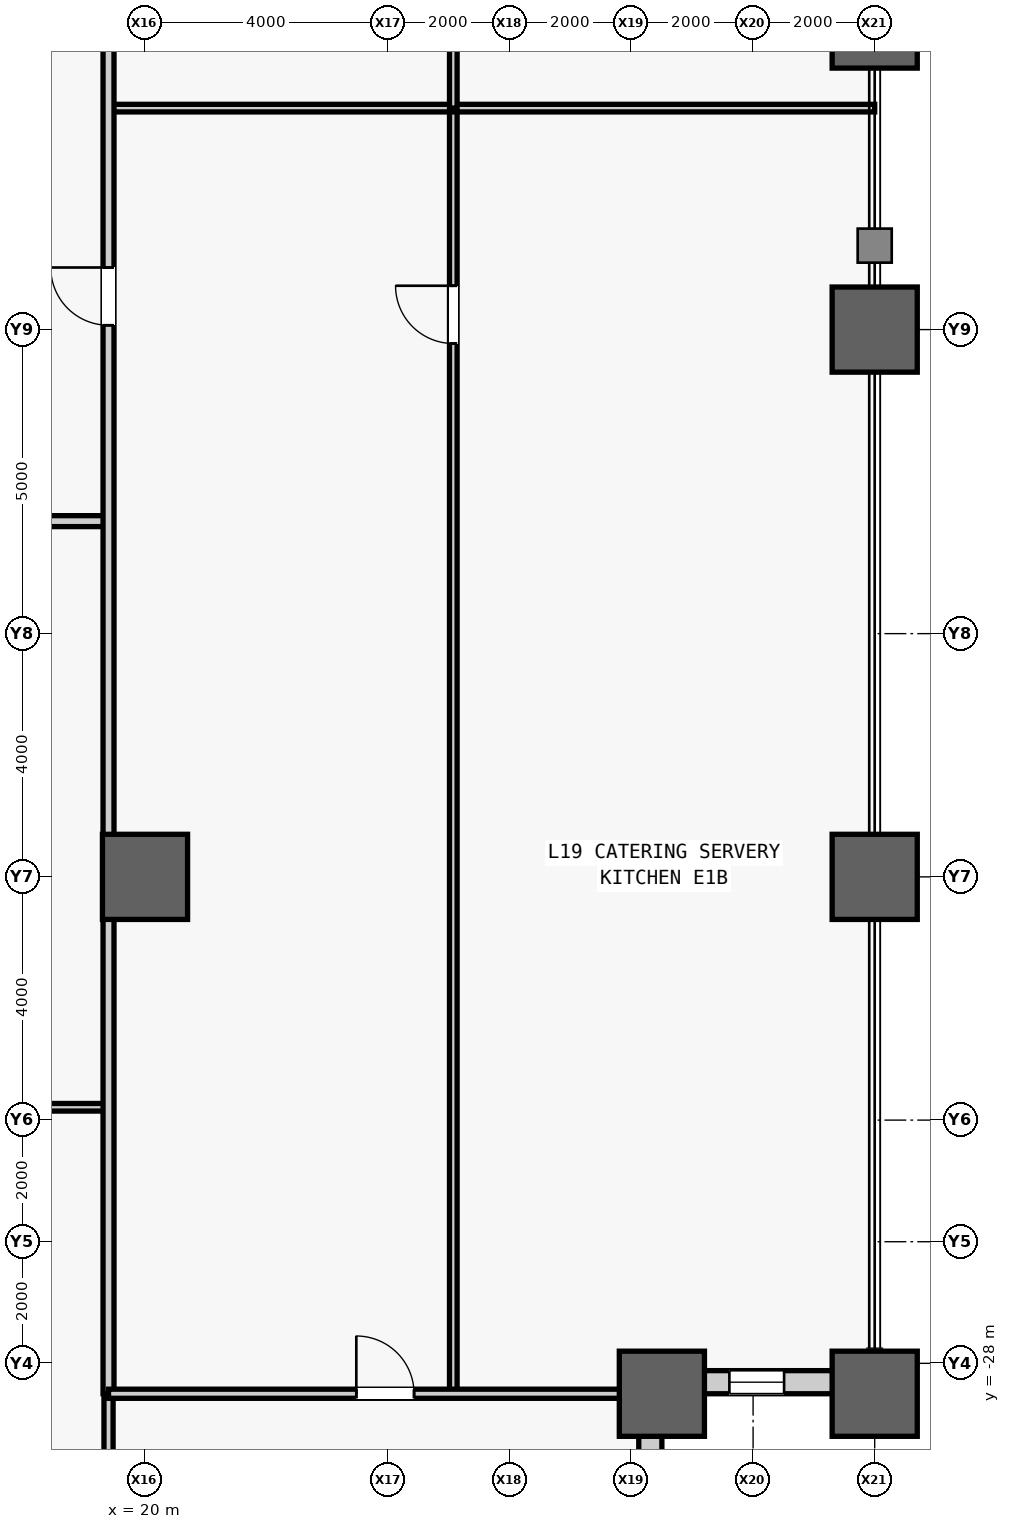
"""IFC4 building model, lengths in metres.
Left out: names, types, materials, properties, quantities, classifications, styles, units other than length and angle.
Written with IfcOpenShell. Run it as: python <this file> out.ifc"""

import sys

from ifc_helpers import new_model, si_unit, direction, frame, frame_2d, origin, origin_2d, place, context, subcontext, project, spatial, rectangle, hollow_rectangle, extrude, source, transform, mapped, element, fill, save


model = new_model("IFC4")
c1 = context("Model", 3, precision=1e-05, world=origin(), true_north=direction((0.0, 1.0)))
c2 = subcontext(c1, "Body", "Model", "MODEL_VIEW")
j1 = project(units=[si_unit("LENGTHUNIT", "METRE"), si_unit("PLANEANGLEUNIT", "RADIAN")], contexts=[c1])
p1 = place(None, origin())
s1 = spatial("IfcSite", under=j1, at=p1, CompositionType="ELEMENT")
p2 = place(p1, origin())
s2 = spatial("IfcBuilding", under=s1, at=p2, CompositionType="ELEMENT")
p3 = place(p2, frame((0.0, 0.0, 87.2)))
s3 = spatial("IfcBuildingStorey", under=s2, at=p3, CompositionType="ELEMENT", Elevation=87.2)
m1 = source(origin(), c2, "Body", "SweptSolid", [
    extrude(hollow_rectangle(XDim=1.4, YDim=1.4, WallThickness=0.075, at=origin_2d()), origin(), (0.0, 0.0, 1.0), 4.2),
])
for number, where, z_axis, x_axis in (
    (1, (20.0, -20.0, 0.0), (0.0, 0.0, 1.0), (1.0, 0.0, 0.0)),
    (2, (28.5, -28.5, 0.0), (0.0, 0.0, 1.0), (1.0, 0.0, 0.0)),
    (3, (32.0, -28.5, 0.0), (0.0, 0.0, 1.0), (1.0, 0.0, 0.0)),
    (4, (32.0, -20.0, 0.0), (0.0, 0.0, 1.0), (1.0, 0.0, 0.0)),
    (5, (32.0, -11.0, 0.0), (0.0, 0.0, 1.0), (1.0, 0.0, 0.0)),
    (6, (32.0, -6.0, 0.0), (0.0, 0.0, 1.0), (1.0, 0.0, 0.0)),
):
    element("IfcColumn", number, at=place(p3, frame(where, z_axis=z_axis, x_axis=x_axis)), inside=s3, PredefinedType="COLUMN", context=c2, shape_type="MappedRepresentation", body=[
        mapped(m1, transform((0.0, 0.0, 0.0), scale=1.0)),
    ])
m2 = source(origin(), c2, "Body", "SweptSolid", [
    extrude(rectangle(XDim=3.12, YDim=0.38, at=frame_2d((1.56, 0.0))), origin(), (0.0, 0.0, 1.0), 2.54),
])
p4 = place(p3, frame((28.31, -31.62, 0.0), z_axis=(0.0, 0.0, 1.0), x_axis=(0.0, 1.0, 0.0)))
e7 = element("IfcWall", 7, at=p4, inside=s3, PredefinedType="STANDARD", context=c2, shape_type="MappedRepresentation", body=[
    mapped(m2, transform((0.0, 0.0, 0.0), scale=1.0)),
])
m3 = source(origin(), c2, "Body", "SweptSolid", [
    extrude(rectangle(XDim=0.9, YDim=1.82, at=frame_2d((0.45, 0.91))), frame((0.0, 0.2, 0.0), z_axis=(0.0, -1.0, 0.0), x_axis=(1.0, 0.0, 0.0)), (0.0, 0.0, 1.0), 0.4),
])
p5 = place(p4, frame((1.11, 0.0, 0.5)))
e8 = element("IfcOpeningElement", 8, at=p5, cuts=e7, PredefinedType="OPENING", context=c2, shape_type="MappedRepresentation", body=[
    mapped(m3, transform((0.0, 0.0, 0.0), scale=1.0)),
])
m4 = source(origin(), c2, "Body", "SweptSolid", [
    extrude(rectangle(XDim=3.12, YDim=0.38, at=frame_2d((1.56, 0.0))), origin(), (0.0, 0.0, 1.0), 3.245),
])
p6 = place(p3, frame((28.5, -28.31, 0.0), z_axis=(0.0, 0.0, 1.0), x_axis=(1.0, 0.0, 0.0)))
e9 = element("IfcWall", 9, at=p6, inside=s3, PredefinedType="STANDARD", context=c2, shape_type="MappedRepresentation", body=[
    mapped(m4, transform((0.0, 0.0, 0.0), scale=1.0)),
])
m5 = source(origin(), c2, "Body", "SweptSolid", [
    extrude(rectangle(XDim=0.9, YDim=2.4, at=frame_2d((0.45, 1.2))), frame((0.0, 0.2, 0.0), z_axis=(0.0, -1.0, 0.0), x_axis=(1.0, 0.0, 0.0)), (0.0, 0.0, 1.0), 0.4),
])
p7 = place(p6, frame((1.11, 0.0, 0.5)))
e10 = element("IfcOpeningElement", 10, at=p7, cuts=e9, PredefinedType="OPENING", context=c2, shape_type="MappedRepresentation", body=[
    mapped(m5, transform((0.0, 0.0, 0.0), scale=1.0)),
])
m6 = source(origin(), c2, "Body", "SweptSolid", [
    extrude(rectangle(XDim=6.072, YDim=0.125, at=frame_2d((3.036, 0.0))), origin(), (0.0, 0.0, 1.0), 3.94),
])
p8 = place(p3, frame((13.328, -23.789, 0.0), z_axis=(0.0, 0.0, 1.0), x_axis=(1.0, 0.0, 0.0)))
e11 = element("IfcWall", 11, at=p8, inside=s3, PredefinedType="PARTITIONING", context=c2, shape_type="MappedRepresentation", body=[
    mapped(m6, transform((0.0, 0.0, 0.0), scale=1.0)),
])
m7 = source(origin(), c2, "Body", "SweptSolid", [
    extrude(rectangle(XDim=0.95, YDim=2.15, at=frame_2d((0.475, 1.075))), frame((0.0, 0.073, 0.0), z_axis=(0.0, -1.0, 0.0), x_axis=(1.0, 0.0, 0.0)), (0.0, 0.0, 1.0), 0.145),
])
p9 = place(p8, frame((2.561, 0.0, 0.0)))
e12 = element("IfcOpeningElement", 12, at=p9, cuts=e11, PredefinedType="OPENING", context=c2, shape_type="MappedRepresentation", body=[
    mapped(m7, transform((0.0, 0.0, 0.0), scale=1.0)),
])
m8 = source(origin(), c2, "Body", "SweptSolid", [
    extrude(rectangle(XDim=37.95, YDim=0.18, at=frame_2d((18.975, 0.0))), origin(), (0.0, 0.0, 1.0), 3.94),
])
p10 = place(p3, frame((-18.55, -14.15, 0.0), z_axis=(0.0, 0.0, 1.0), x_axis=(1.0, 0.0, 0.0)))
e13 = element("IfcWall", 13, at=p10, inside=s3, PredefinedType="PARTITIONING", context=c2, shape_type="MappedRepresentation", body=[
    mapped(m8, transform((0.0, 0.0, 0.0), scale=1.0)),
])
m9 = source(origin(), c2, "Body", "SweptSolid", [
    extrude(rectangle(XDim=1.05, YDim=2.2, at=frame_2d((0.525, 1.1))), frame((0.0, 0.1, 0.0), z_axis=(0.0, -1.0, 0.0), x_axis=(1.0, 0.0, 0.0)), (0.0, 0.0, 1.0), 0.2),
])
p11 = place(p10, frame((4.966, 0.0, 0.0)))
e14 = element("IfcOpeningElement", 14, at=p11, cuts=e13, PredefinedType="OPENING", context=c2, shape_type="MappedRepresentation", body=[
    mapped(m9, transform((0.0, 0.0, 0.0), scale=1.0)),
])
p12 = place(p10, frame((10.291, 0.0, 0.0)))
e15 = element("IfcOpeningElement", 15, at=p12, cuts=e13, PredefinedType="OPENING", context=c2, shape_type="MappedRepresentation", body=[
    mapped(m9, transform((0.0, 0.0, 0.0), scale=1.0)),
])
p13 = place(p10, frame((18.64, 0.0, 0.0)))
e16 = element("IfcOpeningElement", 16, at=p13, cuts=e13, PredefinedType="OPENING", context=c2, shape_type="MappedRepresentation", body=[
    mapped(m9, transform((0.0, 0.0, 0.0), scale=1.0)),
])
p14 = place(p10, frame((27.178, 0.0, 0.0)))
e17 = element("IfcOpeningElement", 17, at=p14, cuts=e13, PredefinedType="OPENING", context=c2, shape_type="MappedRepresentation", body=[
    mapped(m9, transform((0.0, 0.0, 0.0), scale=1.0)),
])
m10 = source(origin(), c2, "Body", "SweptSolid", [
    extrude(rectangle(XDim=3.5, YDim=0.15, at=frame_2d((1.75, 0.0))), origin(), (0.0, 0.0, 1.0), 3.94),
])
p15 = place(p3, frame((19.4, -32.0, 0.0), z_axis=(0.0, 0.0, 1.0), x_axis=(0.0, 1.0, 0.0)))
e18 = element("IfcWall", 18, at=p15, inside=s3, PredefinedType="PARTITIONING", context=c2, shape_type="MappedRepresentation", body=[
    mapped(m10, transform((0.0, 0.0, 0.0), scale=1.0)),
])
m11 = source(origin(), c2, "Body", "SweptSolid", [
    extrude(rectangle(XDim=21.142, YDim=0.125, at=frame_2d((10.571, 0.0))), origin(), (0.0, 0.0, 1.0), 3.94),
])
p16 = place(p3, frame((25.07, -28.5, 0.0), z_axis=(0.0, 0.0, 1.0), x_axis=(0.0, 1.0, 0.0)))
e19 = element("IfcWall", 19, at=p16, inside=s3, PredefinedType="PARTITIONING", context=c2, shape_type="MappedRepresentation", body=[
    mapped(m11, transform((0.0, 0.0, 0.0), scale=1.0)),
])
p17 = place(p16, frame((17.271, 0.0, 0.0)))
e20 = element("IfcOpeningElement", 20, at=p17, cuts=e19, PredefinedType="OPENING", context=c2, shape_type="MappedRepresentation", body=[
    mapped(m7, transform((0.0, 0.0, 0.0), scale=1.0)),
])
m12 = source(origin(), c2, "Body", "SweptSolid", [
    extrude(rectangle(XDim=12.6, YDim=0.125, at=frame_2d((6.3, 0.0))), origin(), (0.0, 0.0, 1.0), 3.94),
])
p18 = place(p3, frame((19.4, -7.358, 0.0), z_axis=(0.0, 0.0, 1.0), x_axis=(1.0, 0.0, 0.0)))
e21 = element("IfcWall", 21, at=p18, inside=s3, PredefinedType="PARTITIONING", context=c2, shape_type="MappedRepresentation", body=[
    mapped(m12, transform((0.0, 0.0, 0.0), scale=1.0)),
])
m13 = source(origin(), c2, "Body", "SweptSolid", [
    extrude(rectangle(XDim=8.773, YDim=0.125, at=frame_2d((4.386, 0.0))), origin(), (0.0, 0.0, 1.0), 3.94),
])
p19 = place(p3, frame((25.07, -7.358, 0.0), z_axis=(0.0, 0.0, 1.0), x_axis=(0.0, 1.0, 0.0)))
e22 = element("IfcWall", 22, at=p19, inside=s3, PredefinedType="PARTITIONING", context=c2, shape_type="MappedRepresentation", body=[
    mapped(m13, transform((0.0, 0.0, 0.0), scale=1.0)),
])
p20 = place(p19, frame((3.912, 0.0, 0.0)))
e23 = element("IfcOpeningElement", 23, at=p20, cuts=e22, PredefinedType="OPENING", context=c2, shape_type="MappedRepresentation", body=[
    mapped(m7, transform((0.0, 0.0, 0.0), scale=1.0)),
])
m14 = source(origin(), c2, "Body", "SweptSolid", [
    extrude(rectangle(XDim=57.0, YDim=0.18, at=frame_2d((28.5, 0.0))), origin(), (0.0, 0.0, 1.0), 3.471),
])
p21 = place(p3, frame((19.4, -28.5, 0.0), z_axis=(0.0, 0.0, 1.0), x_axis=(0.0, 1.0, 0.0)))
e24 = element("IfcWall", 24, at=p21, inside=s3, PredefinedType="PARTITIONING", context=c2, shape_type="MappedRepresentation", body=[
    mapped(m14, transform((0.0, 0.0, 0.0), scale=1.0)),
])
m15 = source(origin(), c2, "Body", "SweptSolid", [
    extrude(rectangle(XDim=0.95, YDim=2.15, at=frame_2d((0.475, 1.075))), frame((0.0, 0.1, 0.0), z_axis=(0.0, -1.0, 0.0), x_axis=(1.0, 0.0, 0.0)), (0.0, 0.0, 1.0), 0.2),
])
p22 = place(p21, frame((17.571, 0.0, 0.0)))
e25 = element("IfcOpeningElement", 25, at=p22, cuts=e24, PredefinedType="OPENING", context=c2, shape_type="MappedRepresentation", body=[
    mapped(m15, transform((0.0, 0.0, 0.0), scale=1.0)),
])
p23 = place(p21, frame((25.053, 0.0, 0.0)))
e26 = element("IfcOpeningElement", 26, at=p23, cuts=e24, PredefinedType="OPENING", context=c2, shape_type="MappedRepresentation", body=[
    mapped(m15, transform((0.0, 0.0, 0.0), scale=1.0)),
])
p24 = place(p21, frame((33.26, 0.0, 0.0)))
e27 = element("IfcOpeningElement", 27, at=p24, cuts=e24, PredefinedType="OPENING", context=c2, shape_type="MappedRepresentation", body=[
    mapped(m15, transform((0.0, 0.0, 0.0), scale=1.0)),
])
p25 = place(p21, frame((39.328, 0.0, 0.0)))
e28 = element("IfcOpeningElement", 28, at=p25, cuts=e24, PredefinedType="OPENING", context=c2, shape_type="MappedRepresentation", body=[
    mapped(m15, transform((0.0, 0.0, 0.0), scale=1.0)),
])
m16 = source(origin(), c2, "Body", "SweptSolid", [
    extrude(rectangle(XDim=9.1, YDim=0.15, at=frame_2d((4.55, 0.0))), origin(), (0.0, 0.0, 1.0), 3.94),
])
p26 = place(p3, frame((19.4, -28.5, 0.0), z_axis=(0.0, 0.0, 1.0), x_axis=(1.0, 0.0, 0.0)))
e29 = element("IfcWall", 29, at=p26, inside=s3, PredefinedType="PARTITIONING", context=c2, shape_type="MappedRepresentation", body=[
    mapped(m16, transform((0.0, 0.0, 0.0), scale=1.0)),
])
m17 = source(origin(), c2, "Body", "SweptSolid", [
    extrude(rectangle(XDim=0.95, YDim=2.15, at=frame_2d((0.475, 1.075))), frame((0.0, 0.085, 0.0), z_axis=(0.0, -1.0, 0.0), x_axis=(1.0, 0.0, 0.0)), (0.0, 0.0, 1.0), 0.17),
])
p27 = place(p26, frame((4.075, 0.0, 0.0)))
e30 = element("IfcOpeningElement", 30, at=p27, cuts=e29, PredefinedType="OPENING", context=c2, shape_type="MappedRepresentation", body=[
    mapped(m17, transform((0.0, 0.0, 0.0), scale=1.0)),
])
m18 = source(origin(), c2, "Body", "SweptSolid", [
    extrude(rectangle(XDim=0.9, YDim=2.4, at=frame_2d((0.45, 1.2))), frame((0.0, 0.03, 0.0), z_axis=(0.0, -1.0, 0.0), x_axis=(1.0, 0.0, 0.0)), (0.0, 0.0, 1.0), 0.06),
])
p28 = place(p7, origin())
e31 = element("IfcWindow", 31, at=p28, inside=s3, PartitioningType="SINGLE_PANEL", PredefinedType="WINDOW", context=c2, shape_type="MappedRepresentation", body=[
    mapped(m18, transform((0.0, 0.0, 0.0), scale=1.0)),
])
fill(e10, e31)
m19 = source(origin(), c2, "Body", "SweptSolid", [
    extrude(rectangle(XDim=0.95, YDim=2.15, at=frame_2d((0.475, 1.075))), frame((0.0, 0.025, 0.0), z_axis=(0.0, -1.0, 0.0), x_axis=(1.0, 0.0, 0.0)), (0.0, 0.0, 1.0), 0.05),
])
p29 = place(p17, origin())
e32 = element("IfcDoor", 32, at=p29, inside=s3, OperationType="SINGLE_SWING_RIGHT", PredefinedType="DOOR", context=c2, shape_type="MappedRepresentation", body=[
    mapped(m19, transform((0.0, 0.0, 0.0), scale=1.0)),
])
fill(e20, e32)
p30 = place(p22, origin())
e33 = element("IfcDoor", 33, at=p30, inside=s3, OperationType="SINGLE_SWING_RIGHT", PredefinedType="DOOR", context=c2, shape_type="MappedRepresentation", body=[
    mapped(m19, transform((0.0, 0.0, 0.0), scale=1.0)),
])
fill(e25, e33)
p31 = place(p27, origin())
e34 = element("IfcDoor", 34, at=p31, inside=s3, OperationType="SINGLE_SWING_LEFT", PredefinedType="DOOR", context=c2, shape_type="MappedRepresentation", body=[
    mapped(m19, transform((0.0, 0.0, 0.0), scale=1.0)),
])
fill(e30, e34)
save(model, sys.argv[1])
